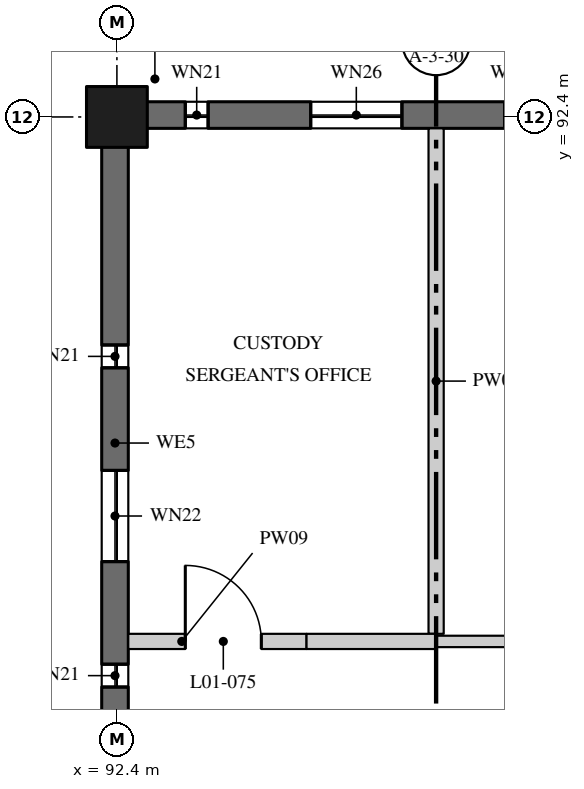
"""IFC4 building model, lengths in metres.
Left out: names, types, materials, properties, quantities, classifications, styles, units other than length and angle.
Written with IfcOpenShell. Run it as: python <this file> out.ifc"""

import sys

from ifc_helpers import new_model, si_unit, direction, frame, frame_2d, origin, origin_2d, place, context, subcontext, project, spatial, rectangle, extrude, element, fill, save


model = new_model("IFC4")
c1 = context("Model", 3, precision=1e-05, world=origin(), true_north=direction((0.0, 1.0)))
c2 = subcontext(c1, "Body", "Model", "MODEL_VIEW")
j1 = project(units=[si_unit("LENGTHUNIT", "METRE"), si_unit("PLANEANGLEUNIT", "RADIAN")], contexts=[c1])
p1 = place(None, origin())
s1 = spatial("IfcSite", under=j1, at=p1, CompositionType="ELEMENT")
p2 = place(p1, origin())
s2 = spatial("IfcBuilding", under=s1, at=p2, CompositionType="ELEMENT")
p3 = place(p2, frame((0.0, 0.0, 5.4)))
s3 = spatial("IfcBuildingStorey", under=s2, at=p3, CompositionType="ELEMENT", Elevation=5.4)
p4 = place(p3, frame((92.4, 92.4, 0.0), z_axis=(0.0, 0.0, 1.0), x_axis=(1.0, 0.0, 0.0)))
e1 = element("IfcColumn", 1, at=p4, inside=s3, PredefinedType="COLUMN", context=c2, shape_type="SweptSolid", body=[
    extrude(rectangle(XDim=0.8, YDim=0.8, at=origin_2d()), origin(), (0.0, 0.0, 1.0), 4.37),
])
p5 = place(p3, frame((96.6, 85.6, 0.0), z_axis=(0.0, 0.0, 1.0), x_axis=(0.0, 1.0, 0.0)))
e2 = element("IfcWall", 2, at=p5, inside=s3, PredefinedType="PARTITIONING", context=c2, shape_type="SweptSolid", body=[
    extrude(rectangle(XDim=6.65, YDim=0.2, at=frame_2d((3.325, 0.0))), origin(), (0.0, 0.0, 1.0), 4.37),
])
p6 = place(p3, frame((92.55, 85.5, 0.0), z_axis=(0.0, 0.0, 1.0), x_axis=(1.0, 0.0, 0.0)))
e3 = element("IfcWall", 3, at=p6, inside=s3, PredefinedType="PARTITIONING", context=c2, shape_type="SweptSolid", body=[
    extrude(rectangle(XDim=2.345, YDim=0.2, at=frame_2d((1.172, 0.0))), origin(), (0.0, 0.0, 1.0), 4.37),
])
p7 = place(p6, frame((0.75, 0.0, 0.0)))
e4 = element("IfcOpeningElement", 4, at=p7, cuts=e3, PredefinedType="OPENING", context=c2, shape_type="SweptSolid", body=[
    extrude(rectangle(XDim=1.0, YDim=2.1, at=frame_2d((0.5, 1.05))), frame((0.0, 0.11, 0.0), z_axis=(0.0, -1.0, 0.0), x_axis=(1.0, 0.0, 0.0)), (0.0, 0.0, 1.0), 0.22),
])
p8 = place(p3, frame((94.895, 85.5, 0.0), z_axis=(0.0, 0.0, 1.0), x_axis=(1.0, 0.0, 0.0)))
e5 = element("IfcWall", 5, at=p8, inside=s3, PredefinedType="PARTITIONING", context=c2, shape_type="SweptSolid", body=[
    extrude(rectangle(XDim=1.705, YDim=0.2, at=frame_2d((0.853, 0.0))), origin(), (0.0, 0.0, 1.0), 3.895),
])
p9 = place(p3, frame((96.6, 85.5, 0.0), z_axis=(0.0, 0.0, 1.0), x_axis=(1.0, 0.0, 0.0)))
e6 = element("IfcWall", 6, at=p9, inside=s3, PredefinedType="PARTITIONING", context=c2, shape_type="SweptSolid", body=[
    extrude(rectangle(XDim=1.63, YDim=0.15, at=frame_2d((0.815, 0.0))), origin(), (0.0, 0.0, 1.0), 3.895),
])
p10 = place(p3, frame((100.42, 92.425, 0.0), z_axis=(0.0, 0.0, 1.0), x_axis=(-1.0, 0.0, 0.0)))
e7 = element("IfcWall", 7, at=p10, inside=s3, PredefinedType="SOLIDWALL", context=c2, shape_type="SweptSolid", body=[
    extrude(rectangle(XDim=7.64, YDim=0.35, at=frame_2d((3.82, 0.0))), origin(), (0.0, 0.0, 1.0), 3.746),
])
p11 = place(p10, frame((2.62, 0.0, 1.5)))
e8 = element("IfcOpeningElement", 8, at=p11, cuts=e7, PredefinedType="OPENING", context=c2, shape_type="SweptSolid", body=[
    extrude(rectangle(XDim=0.3, YDim=1.5, at=frame_2d((0.15, 0.75))), frame((0.0, 0.185, 0.0), z_axis=(0.0, -1.0, 0.0), x_axis=(1.0, 0.0, 0.0)), (0.0, 0.0, 1.0), 0.37),
])
p12 = place(p10, frame((4.27, 0.0, 1.5)))
e9 = element("IfcOpeningElement", 9, at=p12, cuts=e7, PredefinedType="OPENING", context=c2, shape_type="SweptSolid", body=[
    extrude(rectangle(XDim=1.2, YDim=1.8, at=frame_2d((0.6, 0.9))), frame((0.0, 0.185, 0.0), z_axis=(0.0, -1.0, 0.0), x_axis=(1.0, 0.0, 0.0)), (0.0, 0.0, 1.0), 0.37),
])
p13 = place(p10, frame((6.82, 0.0, 1.5)))
e10 = element("IfcOpeningElement", 10, at=p13, cuts=e7, PredefinedType="OPENING", context=c2, shape_type="SweptSolid", body=[
    extrude(rectangle(XDim=0.3, YDim=1.5, at=frame_2d((0.15, 0.75))), frame((0.0, 0.185, 0.0), z_axis=(0.0, -1.0, 0.0), x_axis=(1.0, 0.0, 0.0)), (0.0, 0.0, 1.0), 0.37),
])
p14 = place(p3, frame((92.375, 92.02, 0.0), z_axis=(0.0, 0.0, 1.0), x_axis=(0.0, -1.0, 0.0)))
e11 = element("IfcWall", 11, at=p14, inside=s3, PredefinedType="SOLIDWALL", context=c2, shape_type="SweptSolid", body=[
    extrude(rectangle(XDim=7.82, YDim=0.35, at=frame_2d((3.91, 0.0))), origin(), (0.0, 0.0, 1.0), 3.746),
])
p15 = place(p14, frame((2.62, 0.0, 1.5)))
e12 = element("IfcOpeningElement", 12, at=p15, cuts=e11, PredefinedType="OPENING", context=c2, shape_type="SweptSolid", body=[
    extrude(rectangle(XDim=0.3, YDim=1.5, at=frame_2d((0.15, 0.75))), frame((0.0, 0.185, 0.0), z_axis=(0.0, -1.0, 0.0), x_axis=(1.0, 0.0, 0.0)), (0.0, 0.0, 1.0), 0.37),
])
p16 = place(p14, frame((4.27, 0.0, 1.5)))
e13 = element("IfcOpeningElement", 13, at=p16, cuts=e11, PredefinedType="OPENING", context=c2, shape_type="SweptSolid", body=[
    extrude(rectangle(XDim=1.2, YDim=1.5, at=frame_2d((0.6, 0.75))), frame((0.0, 0.185, 0.0), z_axis=(0.0, -1.0, 0.0), x_axis=(1.0, 0.0, 0.0)), (0.0, 0.0, 1.0), 0.37),
])
p17 = place(p14, frame((6.82, 0.0, 1.5)))
e14 = element("IfcOpeningElement", 14, at=p17, cuts=e11, PredefinedType="OPENING", context=c2, shape_type="SweptSolid", body=[
    extrude(rectangle(XDim=0.3, YDim=1.5, at=frame_2d((0.15, 0.75))), frame((0.0, 0.185, 0.0), z_axis=(0.0, -1.0, 0.0), x_axis=(1.0, 0.0, 0.0)), (0.0, 0.0, 1.0), 0.37),
])
p18 = place(p7, origin())
e15 = element("IfcDoor", 15, at=p18, inside=s3, OperationType="SINGLE_SWING_RIGHT", PredefinedType="DOOR", context=c2, shape_type="SweptSolid", body=[
    extrude(rectangle(XDim=1.0, YDim=2.1, at=frame_2d((0.5, 1.05))), frame((0.0, 0.045, 0.0), z_axis=(0.0, -1.0, 0.0), x_axis=(1.0, 0.0, 0.0)), (0.0, 0.0, 1.0), 0.09),
])
fill(e4, e15)
p19 = place(p11, origin())
e16 = element("IfcWindow", 16, at=p19, inside=s3, PartitioningType="SINGLE_PANEL", PredefinedType="WINDOW", context=c2, shape_type="SweptSolid", body=[
    extrude(rectangle(XDim=0.3, YDim=1.5, at=frame_2d((0.15, 0.75))), frame((0.0, 0.05, 0.0), z_axis=(0.0, -1.0, 0.0), x_axis=(1.0, 0.0, 0.0)), (0.0, 0.0, 1.0), 0.1),
])
fill(e8, e16)
p20 = place(p12, origin())
e17 = element("IfcWindow", 17, at=p20, inside=s3, PartitioningType="SINGLE_PANEL", PredefinedType="WINDOW", context=c2, shape_type="SweptSolid", body=[
    extrude(rectangle(XDim=1.2, YDim=1.8, at=frame_2d((0.6, 0.9))), frame((0.0, 0.03, 0.0), z_axis=(0.0, -1.0, 0.0), x_axis=(1.0, 0.0, 0.0)), (0.0, 0.0, 1.0), 0.06),
])
fill(e9, e17)
p21 = place(p13, origin())
e18 = element("IfcWindow", 18, at=p21, inside=s3, PartitioningType="SINGLE_PANEL", PredefinedType="WINDOW", context=c2, shape_type="SweptSolid", body=[
    extrude(rectangle(XDim=0.3, YDim=1.5, at=frame_2d((0.15, 0.75))), frame((0.0, 0.05, 0.0), z_axis=(0.0, -1.0, 0.0), x_axis=(1.0, 0.0, 0.0)), (0.0, 0.0, 1.0), 0.1),
])
fill(e10, e18)
p22 = place(p15, origin())
e19 = element("IfcWindow", 19, at=p22, inside=s3, PartitioningType="SINGLE_PANEL", PredefinedType="WINDOW", context=c2, shape_type="SweptSolid", body=[
    extrude(rectangle(XDim=0.3, YDim=1.5, at=frame_2d((0.15, 0.75))), frame((0.0, 0.05, 0.0), z_axis=(0.0, -1.0, 0.0), x_axis=(1.0, 0.0, 0.0)), (0.0, 0.0, 1.0), 0.1),
])
fill(e12, e19)
p23 = place(p16, origin())
e20 = element("IfcWindow", 20, at=p23, inside=s3, PartitioningType="SINGLE_PANEL", PredefinedType="WINDOW", context=c2, shape_type="SweptSolid", body=[
    extrude(rectangle(XDim=1.2, YDim=1.5, at=frame_2d((0.6, 0.75))), frame((0.0, 0.04, 0.0), z_axis=(0.0, -1.0, 0.0), x_axis=(1.0, 0.0, 0.0)), (0.0, 0.0, 1.0), 0.08),
])
fill(e13, e20)
p24 = place(p17, origin())
e21 = element("IfcWindow", 21, at=p24, inside=s3, PartitioningType="SINGLE_PANEL", PredefinedType="WINDOW", context=c2, shape_type="SweptSolid", body=[
    extrude(rectangle(XDim=0.3, YDim=1.5, at=frame_2d((0.15, 0.75))), frame((0.0, 0.05, 0.0), z_axis=(0.0, -1.0, 0.0), x_axis=(1.0, 0.0, 0.0)), (0.0, 0.0, 1.0), 0.1),
])
fill(e14, e21)
save(model, sys.argv[1])
